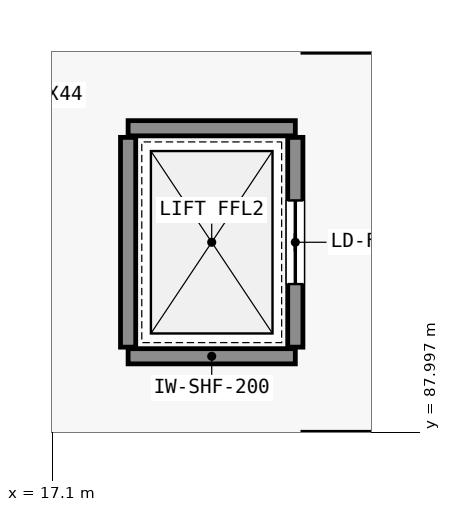
"""IFC4 building model, lengths in metres.
Left out: names, types, materials, properties, quantities, classifications, styles, units other than length and angle.
Written with IfcOpenShell. Run it as: python <this file> out.ifc"""

import sys

from ifc_helpers import new_model, si_unit, direction, frame, frame_2d, origin, place, context, subcontext, project, spatial, rectangle, extrude, element, fill, save


model = new_model("IFC4")
c1 = context("Model", 3, precision=1e-05, world=origin(), true_north=direction((0.0, 1.0)))
c2 = subcontext(c1, "Body", "Model", "MODEL_VIEW")
j1 = project(units=[si_unit("LENGTHUNIT", "METRE"), si_unit("PLANEANGLEUNIT", "RADIAN")], contexts=[c1])
p1 = place(None, origin())
s1 = spatial("IfcSite", under=j1, at=p1, CompositionType="ELEMENT")
p2 = place(p1, origin())
s2 = spatial("IfcBuilding", under=s1, at=p2, CompositionType="ELEMENT")
p3 = place(p2, frame((0.0, 0.0, 16.2)))
s3 = spatial("IfcBuildingStorey", under=s2, at=p3, CompositionType="ELEMENT", Elevation=16.2)
for number, where, z_axis, x_axis in (
    (1, (18.1, 89.0, 0.0), (0.0, 0.0, 1.0), (1.0, 0.0, 0.0)),
    (2, (18.1, 92.0, 0.0), (0.0, 0.0, 1.0), (1.0, 0.0, 0.0)),
):
    element("IfcWall", number, at=place(p3, frame(where, z_axis=z_axis, x_axis=x_axis)), inside=s3, PredefinedType="STANDARD", context=c2, shape_type="SweptSolid", body=[
        extrude(rectangle(XDim=2.2, YDim=0.2, at=frame_2d((1.1, 0.0))), origin(), (0.0, 0.0, 1.0), 4.44),
    ])
p4 = place(p3, frame((18.1, 89.12, 0.0), z_axis=(0.0, 0.0, 1.0), x_axis=(0.0, 1.0, 0.0)))
e3 = element("IfcWall", 3, at=p4, inside=s3, PredefinedType="STANDARD", context=c2, shape_type="SweptSolid", body=[
    extrude(rectangle(XDim=2.76, YDim=0.2, at=frame_2d((1.38, 0.0))), origin(), (0.0, 0.0, 1.0), 4.44),
])
p5 = place(p3, frame((20.3, 89.12, 0.0), z_axis=(0.0, 0.0, 1.0), x_axis=(0.0, 1.0, 0.0)))
e4 = element("IfcWall", 4, at=p5, inside=s3, PredefinedType="STANDARD", context=c2, shape_type="SweptSolid", body=[
    extrude(rectangle(XDim=2.76, YDim=0.2, at=frame_2d((1.38, 0.0))), origin(), (0.0, 0.0, 1.0), 4.44),
])
p6 = place(p5, frame((0.83, 0.0, 0.0)))
e5 = element("IfcOpeningElement", 5, at=p6, cuts=e4, PredefinedType="OPENING", context=c2, shape_type="SweptSolid", body=[
    extrude(rectangle(XDim=1.1, YDim=2.15, at=frame_2d((0.55, 1.075))), frame((0.0, 0.11, 0.0), z_axis=(0.0, -1.0, 0.0), x_axis=(1.0, 0.0, 0.0)), (0.0, 0.0, 1.0), 0.22),
])
p7 = place(p6, origin())
e6 = element("IfcDoor", 6, at=p7, inside=s3, OperationType="SLIDING_TO_LEFT", PredefinedType="DOOR", context=c2, shape_type="SweptSolid", body=[
    extrude(rectangle(XDim=1.1, YDim=2.15, at=frame_2d((0.55, 1.075))), frame((0.0, 0.025, 0.0), z_axis=(0.0, -1.0, 0.0), x_axis=(1.0, 0.0, 0.0)), (0.0, 0.0, 1.0), 0.05),
])
fill(e5, e6)
save(model, sys.argv[1])
